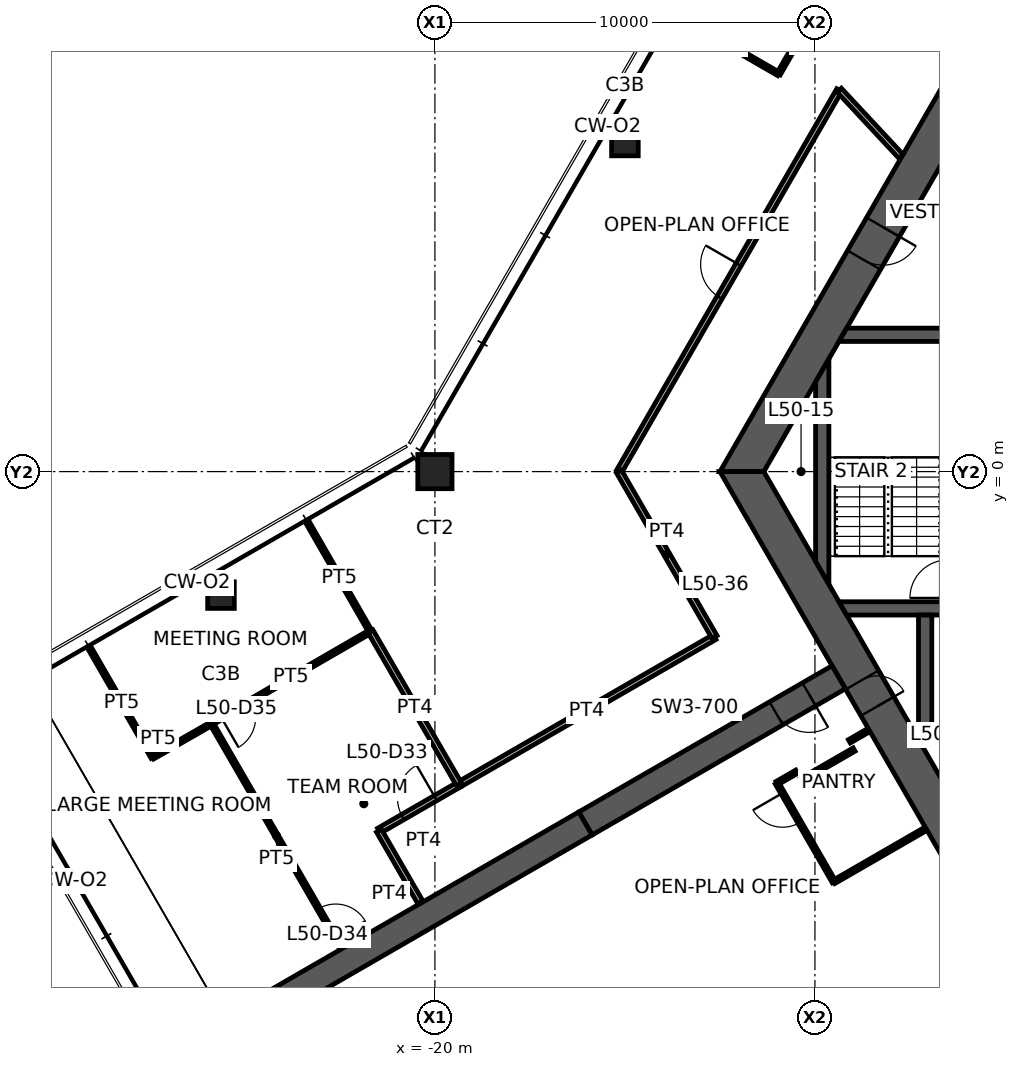
"""IFC4 building model, lengths in metres.
Left out: names, types, materials, properties, quantities, classifications, styles, units other than length and angle.
Written with IfcOpenShell. Run it as: python <this file> out.ifc"""

import sys

from ifc_helpers import new_model, si_unit, direction, frame, frame_2d, origin, origin_2d, place, context, subcontext, project, spatial, polyline, rectangle, hollow_rectangle, outline, extrude, element, fill, save


model = new_model("IFC4")
c1 = context("Model", 3, precision=1e-05, world=origin(), true_north=direction((0.0, 1.0)))
c2 = subcontext(c1, "Body", "Model", "MODEL_VIEW")
j1 = project(units=[si_unit("LENGTHUNIT", "METRE"), si_unit("PLANEANGLEUNIT", "RADIAN")], contexts=[c1])
p1 = place(None, origin())
s1 = spatial("IfcSite", under=j1, at=p1, CompositionType="ELEMENT")
p2 = place(p1, origin())
s2 = spatial("IfcBuilding", under=s1, at=p2, CompositionType="ELEMENT")
p3 = place(p2, frame((0.0, 0.0, 199.4)))
s3 = spatial("IfcBuildingStorey", under=s2, at=p3, CompositionType="ELEMENT", Elevation=199.4)
p4 = place(p3, frame((-20.0, 0.0, 0.0), z_axis=(0.0, 0.0, 1.0), x_axis=(1.0, 0.0, 0.0)))
e1 = element("IfcColumn", 1, at=p4, inside=s3, PredefinedType="COLUMN", context=c2, shape_type="SweptSolid", body=[
    extrude(hollow_rectangle(XDim=0.9, YDim=0.9, WallThickness=0.09, at=origin_2d()), origin(), (0.0, 0.0, 1.0), 3.9),
])
for number, where, z_axis, x_axis in (
    (2, (-15.0, 8.66, 0.0), (0.0, 0.0, 1.0), (1.0, 0.0, 0.0)),
    (3, (-25.629, -3.25, 0.0), (0.0, 0.0, 1.0), (1.0, 0.0, 0.0)),
):
    element("IfcColumn", number, at=place(p3, frame(where, z_axis=z_axis, x_axis=x_axis)), inside=s3, PredefinedType="COLUMN", context=c2, shape_type="SweptSolid", body=[
        extrude(hollow_rectangle(XDim=0.7, YDim=0.7, WallThickness=0.036, at=origin_2d()), origin(), (0.0, 0.0, 1.0), 3.9),
    ])
p5 = place(p3, frame((-5.961, 10.325, 0.0), z_axis=(0.0, 0.0, 1.0), x_axis=(-0.500004296715, -0.866022923061, 0.0)))
e4 = element("IfcWall", 4, at=p5, inside=s3, PredefinedType="SHEAR", context=c2, shape_type="SweptSolid", body=[
    extrude(outline(polyline([(-0.289, -0.5), (4.494, -0.5), (5.494, -0.5), (12.211, -0.5), (11.634, 0.5), (5.494, 0.5), (4.494, 0.5), (0.289, 0.5), (-0.289, -0.5)])), origin(), (0.0, 0.0, 1.0), 3.9),
])
p6 = place(p5, frame((4.494, 0.0, 0.0)))
e5 = element("IfcOpeningElement", 5, at=p6, cuts=e4, PredefinedType="OPENING", context=c2, shape_type="SweptSolid", body=[
    extrude(rectangle(XDim=1.0, YDim=2.1, at=frame_2d((0.5, 1.05))), frame((0.0, 0.51, 0.0), z_axis=(0.0, -1.0, 0.0), x_axis=(1.0, 0.0, 0.0)), (0.0, 0.0, 1.0), 1.02),
])
p7 = place(p3, frame((-11.922, 0.0, 0.0), z_axis=(0.0, 0.0, 1.0), x_axis=(0.500004296715, -0.866022923061, 0.0)))
e6 = element("IfcWall", 6, at=p7, inside=s3, PredefinedType="SHEAR", context=c2, shape_type="SweptSolid", body=[
    extrude(outline(polyline([(-0.289, -0.5), (6.331, -0.5), (7.131, -0.5), (12.211, -0.5), (11.634, 0.5), (7.131, 0.5), (6.331, 0.5), (0.289, 0.5), (-0.289, -0.5)])), origin(), (0.0, 0.0, 1.0), 3.9),
])
p8 = place(p7, frame((6.331, 0.0, 0.0)))
e7 = element("IfcOpeningElement", 7, at=p8, cuts=e6, PredefinedType="OPENING", context=c2, shape_type="SweptSolid", body=[
    extrude(rectangle(XDim=0.8, YDim=2.1, at=frame_2d((0.4, 1.05))), frame((0.0, 0.51, 0.0), z_axis=(0.0, -1.0, 0.0), x_axis=(1.0, 0.0, 0.0)), (0.0, 0.0, 1.0), 1.02),
])
p9 = place(p3, frame((-9.375, -5.413, 0.0), z_axis=(0.0, 0.0, 1.0), x_axis=(-0.866032377459, -0.499987921047, 0.0)))
e8 = element("IfcWall", 8, at=p9, inside=s3, PredefinedType="SHEAR", context=c2, shape_type="SweptSolid", body=[
    extrude(rectangle(XDim=7.696, YDim=0.7, at=frame_2d((3.848, 0.0))), origin(), (0.0, 0.0, 1.0), 3.9),
])
p10 = place(p9, frame((0.9, 0.0, 0.0)))
e9 = element("IfcOpeningElement", 9, at=p10, cuts=e8, PredefinedType="OPENING", context=c2, shape_type="SweptSolid", body=[
    extrude(rectangle(XDim=1.0, YDim=2.1, at=frame_2d((0.5, 1.05))), frame((0.0, 0.36, 0.0), z_axis=(0.0, -1.0, 0.0), x_axis=(1.0, 0.0, 0.0)), (0.0, 0.0, 1.0), 0.72),
])
p11 = place(p3, frame((-16.039, -9.26, 0.0), z_axis=(0.0, 0.0, 1.0), x_axis=(-0.866024837091, -0.50000098154, 0.0)))
e10 = element("IfcWall", 10, at=p11, inside=s3, PredefinedType="SHEAR", context=c2, shape_type="SweptSolid", body=[
    extrude(rectangle(XDim=13.0, YDim=0.7, at=frame_2d((6.5, 0.0))), origin(), (0.0, 0.0, 1.0), 3.9),
])
p12 = place(p3, frame((-9.266, 3.6, 0.0), z_axis=(0.0, 0.0, 1.0), x_axis=(1.0, 0.0, 0.0)))
e11 = element("IfcWall", 11, at=p12, inside=s3, PredefinedType="SHEAR", context=c2, shape_type="SweptSolid", body=[
    extrude(outline(polyline([(-0.101, -0.175), (3.266, -0.175), (4.266, -0.175), (5.667, -0.175), (6.767, -0.175), (7.841, -0.175), (7.841, 0.175), (6.767, 0.175), (5.667, 0.175), (4.266, 0.175), (3.266, 0.175), (0.101, 0.175), (-0.101, -0.175)])), origin(), (0.0, 0.0, 1.0), 3.9),
])
p13 = place(p12, frame((3.266, 0.0, 0.0)))
e12 = element("IfcOpeningElement", 12, at=p13, cuts=e11, PredefinedType="OPENING", context=c2, shape_type="SweptSolid", body=[
    extrude(rectangle(XDim=1.0, YDim=2.1, at=frame_2d((0.5, 1.05))), frame((0.0, 0.185, 0.0), z_axis=(0.0, -1.0, 0.0), x_axis=(1.0, 0.0, 0.0)), (0.0, 0.0, 1.0), 0.37),
])
p14 = place(p12, frame((5.667, 0.0, 0.0)))
e13 = element("IfcOpeningElement", 13, at=p14, cuts=e11, PredefinedType="OPENING", context=c2, shape_type="SweptSolid", body=[
    extrude(rectangle(XDim=1.1, YDim=2.1, at=frame_2d((0.55, 1.05))), frame((0.0, 0.185, 0.0), z_axis=(0.0, -1.0, 0.0), x_axis=(1.0, 0.0, 0.0)), (0.0, 0.0, 1.0), 0.37),
])
p15 = place(p3, frame((-9.266, -3.6, 0.0), z_axis=(0.0, 0.0, 1.0), x_axis=(1.0, 0.0, 0.0)))
e14 = element("IfcWall", 14, at=p15, inside=s3, PredefinedType="SHEAR", context=c2, shape_type="SweptSolid", body=[
    extrude(outline(polyline([(0.101, -0.175), (3.116, -0.175), (4.417, -0.175), (5.667, -0.175), (6.767, -0.175), (7.841, -0.175), (7.841, 0.175), (6.767, 0.175), (5.667, 0.175), (4.417, 0.175), (3.116, 0.175), (-0.101, 0.175), (0.101, -0.175)])), origin(), (0.0, 0.0, 1.0), 3.9),
])
p16 = place(p15, frame((5.667, 0.0, 0.0)))
e15 = element("IfcOpeningElement", 15, at=p16, cuts=e14, PredefinedType="OPENING", context=c2, shape_type="SweptSolid", body=[
    extrude(rectangle(XDim=1.1, YDim=2.1, at=frame_2d((0.55, 1.05))), frame((0.0, 0.185, 0.0), z_axis=(0.0, -1.0, 0.0), x_axis=(1.0, 0.0, 0.0)), (0.0, 0.0, 1.0), 0.37),
])
p17 = place(p15, frame((3.116, 0.0, 0.0)))
e16 = element("IfcOpeningElement", 16, at=p17, cuts=e14, PredefinedType="OPENING", context=c2, shape_type="SweptSolid", body=[
    extrude(rectangle(XDim=1.3, YDim=2.1, at=frame_2d((0.65, 1.05))), frame((0.0, 0.185, 0.0), z_axis=(0.0, -1.0, 0.0), x_axis=(1.0, 0.0, 0.0)), (0.0, 0.0, 1.0), 0.37),
])
p18 = place(p3, frame((-6.925, -7.0, 0.0), z_axis=(0.0, 0.0, 1.0), x_axis=(1.0, 0.0, 0.0)))
e17 = element("IfcWall", 17, at=p18, inside=s3, PredefinedType="SHEAR", context=c2, shape_type="SweptSolid", body=[
    extrude(rectangle(XDim=2.25, YDim=0.35, at=frame_2d((1.125, 0.0))), origin(), (0.0, 0.0, 1.0), 3.9),
])
p19 = place(p3, frame((-7.1, -3.775, 0.0), z_axis=(0.0, 0.0, 1.0), x_axis=(0.0, -1.0, 0.0)))
e18 = element("IfcWall", 18, at=p19, inside=s3, PredefinedType="SHEAR", context=c2, shape_type="SweptSolid", body=[
    extrude(outline(polyline([(0.0, -0.175), (3.274, -0.175), (3.4, 0.0), (3.4, 0.175), (0.0, 0.175), (0.0, -0.175)])), origin(), (0.0, 0.0, 1.0), 3.9),
])
p20 = place(p3, frame((-9.808, -2.662, 0.0), z_axis=(0.0, 0.0, 1.0), x_axis=(0.0, 1.0, 0.0)))
e19 = element("IfcWall", 19, at=p20, inside=s3, PredefinedType="SHEAR", context=c2, shape_type="SweptSolid", body=[
    extrude(outline(polyline([(-0.303, -0.175), (5.628, -0.175), (5.021, 0.175), (0.303, 0.175), (-0.303, -0.175)])), origin(), (0.0, 0.0, 1.0), 3.9),
])
p21 = place(p3, frame((-19.372, -8.24, 0.0), z_axis=(0.0, 0.0, 1.0), x_axis=(0.866015031168, 0.500017965468, 0.0)))
e20 = element("IfcWall", 20, at=p21, inside=s3, PredefinedType="PARTITIONING", context=c2, shape_type="SweptSolid", body=[
    extrude(rectangle(XDim=7.771, YDim=0.15, at=frame_2d((3.886, 0.0))), origin(), (0.0, 0.0, 1.0), 2.35),
])
p22 = place(p3, frame((-15.156, 0.0, 0.0), z_axis=(0.0, 0.0, 1.0), x_axis=(0.500012970505, 0.86601791513, 0.0)))
e21 = element("IfcWall", 21, at=p22, inside=s3, PredefinedType="PARTITIONING", context=c2, shape_type="SweptSolid", body=[
    extrude(rectangle(XDim=11.591, YDim=0.15, at=frame_2d((5.795, 0.0))), origin(), (0.0, 0.0, 1.0), 2.35),
])
p23 = place(p22, frame((5.295, 0.0, 0.0)))
e22 = element("IfcOpeningElement", 22, at=p23, cuts=e21, PredefinedType="OPENING", context=c2, shape_type="SweptSolid", body=[
    extrude(rectangle(XDim=1.0, YDim=2.1, at=frame_2d((0.5, 1.05))), frame((0.0, 0.085, 0.0), z_axis=(0.0, -1.0, 0.0), x_axis=(1.0, 0.0, 0.0)), (0.0, 0.0, 1.0), 0.17),
])
p24 = place(p3, frame((-12.642, -4.354, 0.0), z_axis=(0.0, 0.0, 1.0), x_axis=(-0.500019495363, 0.866014147839, 0.0)))
e23 = element("IfcWall", 23, at=p24, inside=s3, PredefinedType="PARTITIONING", context=c2, shape_type="SweptSolid", body=[
    extrude(rectangle(XDim=5.028, YDim=0.15, at=frame_2d((2.514, 0.0))), origin(), (0.0, 0.0, 1.0), 2.35),
])
p25 = place(p3, frame((-9.36, 10.038, 0.0), z_axis=(0.0, 0.0, 1.0), x_axis=(0.681997114248, -0.731354863358, 0.0)))
e24 = element("IfcWall", 24, at=p25, inside=s3, PredefinedType="PARTITIONING", context=c2, shape_type="SweptSolid", body=[
    extrude(outline(polyline([(0.0, -0.075), (2.384, -0.075), (2.384, 0.0), (2.382, 0.075), (0.0, 0.075), (0.0, -0.075)])), origin(), (0.0, 0.0, 1.0), 2.35),
])
p26 = place(p3, frame((-21.471, -9.452, 0.0), z_axis=(0.0, 0.0, 1.0), x_axis=(0.866025270247, 0.500000231294, 0.0)))
e25 = element("IfcWall", 25, at=p26, inside=s3, PredefinedType="PARTITIONING", context=c2, shape_type="SweptSolid", body=[
    extrude(rectangle(XDim=2.435, YDim=0.15, at=frame_2d((1.217, 0.0))), origin(), (0.0, 0.0, 1.0), 2.35),
])
p27 = place(p26, frame((0.717, 0.0, 0.0)))
e26 = element("IfcOpeningElement", 26, at=p27, cuts=e25, PredefinedType="OPENING", context=c2, shape_type="SweptSolid", body=[
    extrude(rectangle(XDim=1.0, YDim=2.1, at=frame_2d((0.5, 1.05))), frame((0.0, 0.085, 0.0), z_axis=(0.0, -1.0, 0.0), x_axis=(1.0, 0.0, 0.0)), (0.0, 0.0, 1.0), 0.17),
])
p28 = place(p3, frame((-20.381, -11.34, 0.0), z_axis=(0.0, 0.0, 1.0), x_axis=(-0.500029427677, 0.866008413041, 0.0)))
e27 = element("IfcWall", 27, at=p28, inside=s3, PredefinedType="PARTITIONING", context=c2, shape_type="SweptSolid", body=[
    extrude(rectangle(XDim=2.18, YDim=0.15, at=frame_2d((1.09, 0.0))), origin(), (0.0, 0.0, 1.0), 2.35),
])
p29 = place(p3, frame((-29.065, -4.68, 0.0), z_axis=(0.0, 0.0, 1.0), x_axis=(0.500061797536, -0.86598972202, 0.0)))
e28 = element("IfcWall", 28, at=p29, inside=s3, PredefinedType="PARTITIONING", context=c2, shape_type="SweptSolid", body=[
    extrude(rectangle(XDim=3.28, YDim=0.1, at=frame_2d((1.64, 0.0))), origin(), (0.0, 0.0, 1.0), 2.35),
])
p30 = place(p3, frame((-27.425, -7.52, 0.0), z_axis=(0.0, 0.0, 1.0), x_axis=(0.867394737581, 0.497620708188, 0.0)))
e29 = element("IfcWall", 29, at=p30, inside=s3, PredefinedType="PARTITIONING", context=c2, shape_type="SweptSolid", body=[
    extrude(rectangle(XDim=1.791, YDim=0.1, at=frame_2d((0.896, 0.0))), origin(), (0.0, 0.0, 1.0), 2.35),
])
p31 = place(p3, frame((-25.878, -6.627, 0.0), z_axis=(0.0, 0.0, 1.0), x_axis=(0.500502111965, -0.865735315162, 0.0)))
e30 = element("IfcWall", 30, at=p31, inside=s3, PredefinedType="PARTITIONING", context=c2, shape_type="SweptSolid", body=[
    extrude(rectangle(XDim=6.83, YDim=0.1, at=frame_2d((3.415, 0.0))), origin(), (0.0, 0.0, 1.0), 2.35),
])
p32 = place(p31, frame((5.63, 0.0, 0.0)))
e31 = element("IfcOpeningElement", 31, at=p32, cuts=e30, PredefinedType="OPENING", context=c2, shape_type="SweptSolid", body=[
    extrude(rectangle(XDim=0.9, YDim=2.1, at=frame_2d((0.45, 1.05))), frame((0.0, 0.06, 0.0), z_axis=(0.0, -1.0, 0.0), x_axis=(1.0, 0.0, 0.0)), (0.0, 0.0, 1.0), 0.12),
])
p33 = place(p3, frame((-23.332, -1.37, 0.0), z_axis=(0.0, 0.0, 1.0), x_axis=(0.498789948492, -0.866722901095, 0.0)))
e32 = element("IfcWall", 32, at=p33, inside=s3, PredefinedType="PARTITIONING", context=c2, shape_type="SweptSolid", body=[
    extrude(rectangle(XDim=3.28, YDim=0.1, at=frame_2d((1.64, 0.0))), origin(), (0.0, 0.0, 1.0), 2.35),
])
p34 = place(p3, frame((-21.695, -4.206, 0.0), z_axis=(0.0, 0.0, 1.0), x_axis=(-0.865554211136, -0.500815242963, 0.0)))
e33 = element("IfcWall", 33, at=p34, inside=s3, PredefinedType="PARTITIONING", context=c2, shape_type="SweptSolid", body=[
    extrude(rectangle(XDim=4.833, YDim=0.1, at=frame_2d((2.417, 0.0))), origin(), (0.0, 0.0, 1.0), 2.35),
])
p35 = place(p34, frame((3.633, 0.0, 0.0)))
e34 = element("IfcOpeningElement", 34, at=p35, cuts=e33, PredefinedType="OPENING", context=c2, shape_type="SweptSolid", body=[
    extrude(rectangle(XDim=0.9, YDim=2.1, at=frame_2d((0.45, 1.05))), frame((0.0, 0.06, 0.0), z_axis=(0.0, -1.0, 0.0), x_axis=(1.0, 0.0, 0.0)), (0.0, 0.0, 1.0), 0.12),
])
p36 = place(p3, frame((-10.956, 10.465, 0.0), z_axis=(0.0, 0.0, 1.0), x_axis=(-0.866012296238, 0.500022702249, 0.0)))
e35 = element("IfcWall", 35, at=p36, inside=s3, PredefinedType="PARTITIONING", context=c2, shape_type="SweptSolid", body=[
    extrude(rectangle(XDim=3.144, YDim=0.1, at=frame_2d((1.572, 0.0))), origin(), (0.0, 0.0, 1.0), 2.35),
])
p37 = place(p3, frame((-9.291, 13.349, 0.0), z_axis=(0.0, 0.0, 1.0), x_axis=(-0.500033344505, -0.86600615147, 0.0)))
e36 = element("IfcWall", 36, at=p37, inside=s3, PredefinedType="PARTITIONING", context=c2, shape_type="SweptSolid", body=[
    extrude(rectangle(XDim=3.331, YDim=0.1, at=frame_2d((1.666, 0.0))), origin(), (0.0, 0.0, 1.0), 2.35),
])
p38 = place(p37, frame((0.3, 0.0, 0.0)))
e37 = element("IfcOpeningElement", 37, at=p38, cuts=e36, PredefinedType="OPENING", context=c2, shape_type="SweptSolid", body=[
    extrude(rectangle(XDim=0.9, YDim=2.1, at=frame_2d((0.45, 1.05))), frame((0.0, 0.06, 0.0), z_axis=(0.0, -1.0, 0.0), x_axis=(1.0, 0.0, 0.0)), (0.0, 0.0, 1.0), 0.12),
])
p39 = place(p3, frame((-19.363, -8.234, 0.0), z_axis=(0.0, 0.0, 1.0), x_axis=(-0.500877035324, 0.865518454734, 0.0)))
e38 = element("IfcWall", 38, at=p39, inside=s3, PredefinedType="PARTITIONING", context=c2, shape_type="SweptSolid", body=[
    extrude(rectangle(XDim=4.654, YDim=0.15, at=frame_2d((2.327, 0.0))), origin(), (0.0, 0.0, 1.0), 2.35),
])
p40 = place(p3, frame((-11.0, -8.198, 0.0), z_axis=(0.0, 0.0, 1.0), x_axis=(0.866131372301, 0.499816412211, 0.0)))
e39 = element("IfcWall", 39, at=p40, inside=s3, PredefinedType="PARTITIONING", context=c2, shape_type="SweptSolid", body=[
    extrude(rectangle(XDim=0.6, YDim=0.1, at=frame_2d((0.3, 0.0))), origin(), (0.0, 0.0, 1.0), 2.35),
])
p41 = place(p3, frame((-10.355, -8.115, 0.0), z_axis=(0.0, 0.0, 1.0), x_axis=(0.866094119867, 0.499880961361, 0.0)))
e40 = element("IfcWall", 40, at=p41, inside=s3, PredefinedType="PARTITIONING", context=c2, shape_type="SweptSolid", body=[
    extrude(rectangle(XDim=1.6, YDim=0.1, at=frame_2d((0.8, 0.0))), origin(), (0.0, 0.0, 1.0), 2.35),
])
p42 = place(p3, frame((-9.5, -10.796, 0.0), z_axis=(0.0, 0.0, 1.0), x_axis=(-0.499990139034, 0.866031096941, 0.0)))
e41 = element("IfcWall", 41, at=p42, inside=s3, PredefinedType="PARTITIONING", context=c2, shape_type="SweptSolid", body=[
    extrude(rectangle(XDim=3.0, YDim=0.1, at=frame_2d((1.5, 0.0))), origin(), (0.0, 0.0, 1.0), 2.35),
])
p43 = place(p42, frame((1.8, 0.0, 0.0)))
e42 = element("IfcOpeningElement", 42, at=p43, cuts=e41, PredefinedType="OPENING", context=c2, shape_type="SweptSolid", body=[
    extrude(rectangle(XDim=0.9, YDim=2.1, at=frame_2d((0.45, 1.05))), frame((0.0, 0.06, 0.0), z_axis=(0.0, -1.0, 0.0), x_axis=(1.0, 0.0, 0.0)), (0.0, 0.0, 1.0), 0.12),
])
p44 = place(p3, frame((-9.094, -7.098, 0.0), z_axis=(0.0, 0.0, 1.0), x_axis=(0.865954211699, 0.50012328804, 0.0)))
e43 = element("IfcWall", 43, at=p44, inside=s3, PredefinedType="PARTITIONING", context=c2, shape_type="SweptSolid", body=[
    extrude(rectangle(XDim=0.58, YDim=0.1, at=frame_2d((0.29, 0.0))), origin(), (0.0, 0.0, 1.0), 2.35),
])
p45 = place(p3, frame((-7.092, -9.406, 0.0), z_axis=(0.0, 0.0, 1.0), x_axis=(-0.86603494908, -0.499983466698, 0.0)))
e44 = element("IfcWall", 44, at=p45, inside=s3, PredefinedType="PARTITIONING", context=c2, shape_type="SweptSolid", body=[
    extrude(rectangle(XDim=2.78, YDim=0.1, at=frame_2d((1.39, 0.0))), origin(), (0.0, 0.0, 1.0), 2.35),
])
p46 = place(p8, origin())
e45 = element("IfcDoor", 45, at=p46, inside=s3, OperationType="SINGLE_SWING_RIGHT", PredefinedType="DOOR", context=c2, shape_type="SweptSolid", body=[
    extrude(rectangle(XDim=0.8, YDim=2.1, at=frame_2d((0.4, 1.05))), frame((0.0, 0.025, 0.0), z_axis=(0.0, -1.0, 0.0), x_axis=(1.0, 0.0, 0.0)), (0.0, 0.0, 1.0), 0.05),
])
fill(e7, e45)
p47 = place(p6, origin())
e46 = element("IfcDoor", 46, at=p47, inside=s3, OperationType="SINGLE_SWING_LEFT", PredefinedType="DOOR", context=c2, shape_type="SweptSolid", body=[
    extrude(rectangle(XDim=1.0, YDim=2.1, at=frame_2d((0.5, 1.05))), frame((0.0, 0.025, 0.0), z_axis=(0.0, -1.0, 0.0), x_axis=(1.0, 0.0, 0.0)), (0.0, 0.0, 1.0), 0.05),
])
fill(e5, e46)
p48 = place(p10, origin())
e47 = element("IfcDoor", 47, at=p48, inside=s3, OperationType="SINGLE_SWING_LEFT", PredefinedType="DOOR", context=c2, shape_type="SweptSolid", body=[
    extrude(rectangle(XDim=1.0, YDim=2.1, at=frame_2d((0.5, 1.05))), frame((0.0, 0.025, 0.0), z_axis=(0.0, -1.0, 0.0), x_axis=(1.0, 0.0, 0.0)), (0.0, 0.0, 1.0), 0.05),
])
fill(e9, e47)
p49 = place(p23, origin())
e48 = element("IfcDoor", 48, at=p49, inside=s3, OperationType="SINGLE_SWING_RIGHT", PredefinedType="DOOR", context=c2, shape_type="SweptSolid", body=[
    extrude(rectangle(XDim=1.0, YDim=2.1, at=frame_2d((0.5, 1.05))), frame((0.0, 0.025, 0.0), z_axis=(0.0, -1.0, 0.0), x_axis=(1.0, 0.0, 0.0)), (0.0, 0.0, 1.0), 0.05),
])
fill(e22, e48)
p50 = place(p27, origin())
e49 = element("IfcDoor", 49, at=p50, inside=s3, OperationType="SINGLE_SWING_RIGHT", PredefinedType="DOOR", context=c2, shape_type="SweptSolid", body=[
    extrude(rectangle(XDim=1.0, YDim=2.1, at=frame_2d((0.5, 1.05))), frame((0.0, 0.025, 0.0), z_axis=(0.0, -1.0, 0.0), x_axis=(1.0, 0.0, 0.0)), (0.0, 0.0, 1.0), 0.05),
])
fill(e26, e49)
p51 = place(p32, origin())
e50 = element("IfcDoor", 50, at=p51, inside=s3, OperationType="SINGLE_SWING_RIGHT", PredefinedType="DOOR", context=c2, shape_type="SweptSolid", body=[
    extrude(rectangle(XDim=0.9, YDim=2.1, at=frame_2d((0.45, 1.05))), frame((0.0, 0.025, 0.0), z_axis=(0.0, -1.0, 0.0), x_axis=(1.0, 0.0, 0.0)), (0.0, 0.0, 1.0), 0.05),
])
fill(e31, e50)
p52 = place(p35, origin())
e51 = element("IfcDoor", 51, at=p52, inside=s3, OperationType="SINGLE_SWING_RIGHT", PredefinedType="DOOR", context=c2, shape_type="SweptSolid", body=[
    extrude(rectangle(XDim=0.9, YDim=2.1, at=frame_2d((0.45, 1.05))), frame((0.0, 0.025, 0.0), z_axis=(0.0, -1.0, 0.0), x_axis=(1.0, 0.0, 0.0)), (0.0, 0.0, 1.0), 0.05),
])
fill(e34, e51)
p53 = place(p43, origin())
e52 = element("IfcDoor", 52, at=p53, inside=s3, OperationType="SINGLE_SWING_RIGHT", PredefinedType="DOOR", context=c2, shape_type="SweptSolid", body=[
    extrude(rectangle(XDim=0.9, YDim=2.1, at=frame_2d((0.45, 1.05))), frame((0.0, 0.025, 0.0), z_axis=(0.0, -1.0, 0.0), x_axis=(1.0, 0.0, 0.0)), (0.0, 0.0, 1.0), 0.05),
])
fill(e42, e52)
save(model, sys.argv[1])
